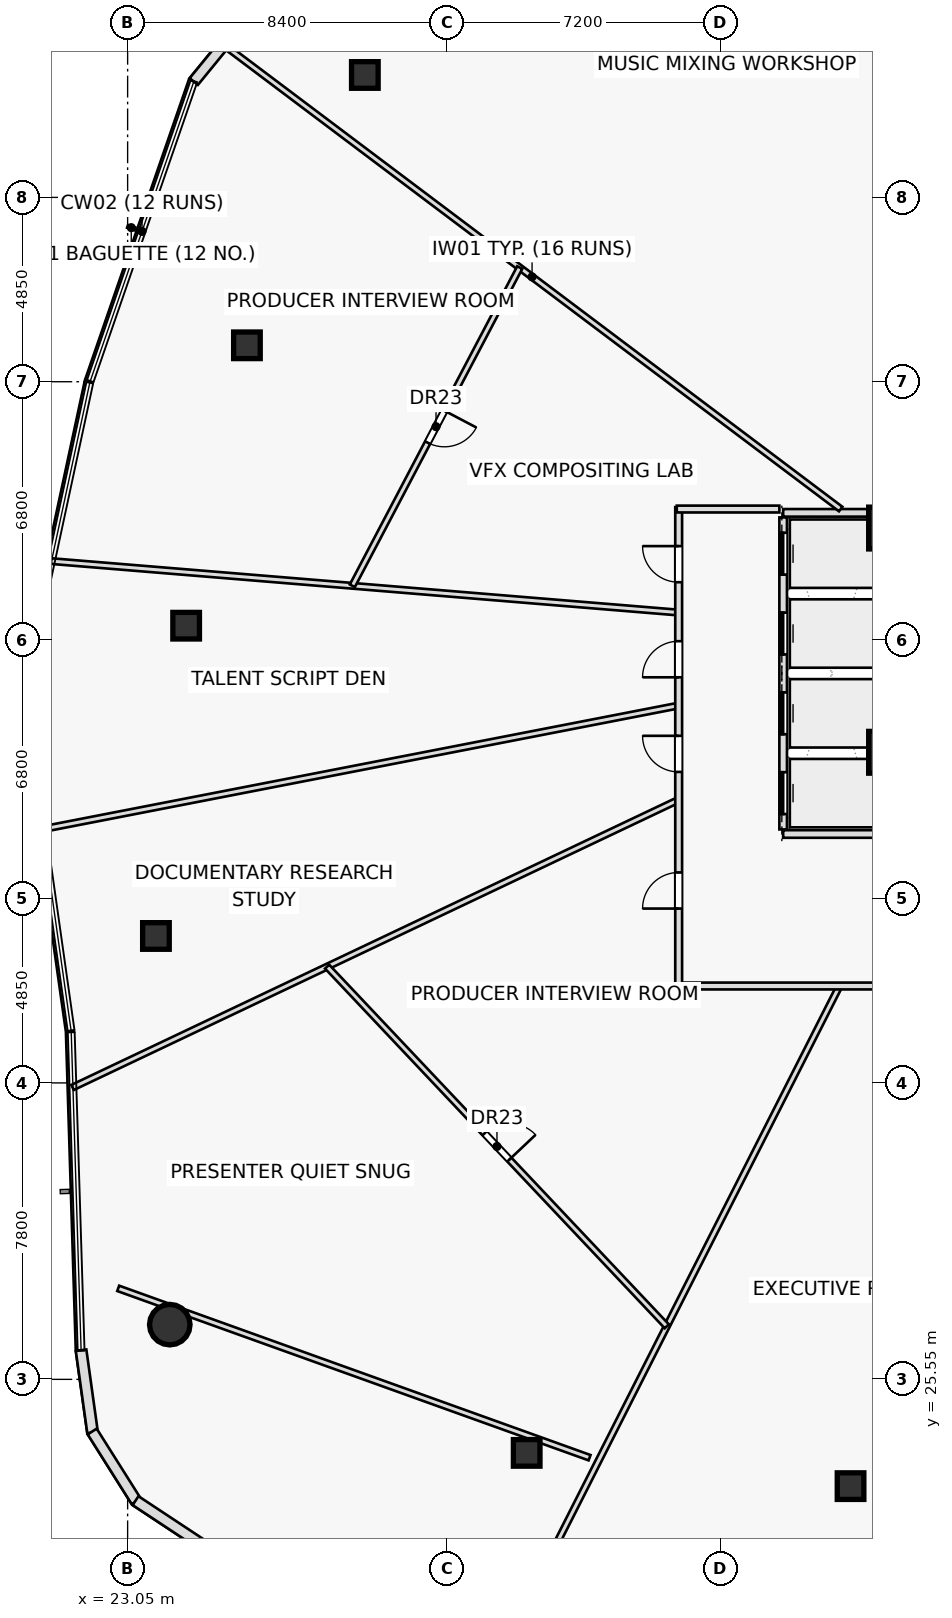
"""IFC4 building model, lengths in metres.
Left out: names, types, materials, properties, quantities, classifications, styles, units other than length and angle.
Written with IfcOpenShell. Run it as: python <this file> out.ifc"""

import sys

from ifc_helpers import new_model, si_unit, direction, frame, frame_2d, origin, origin_2d, place, context, subcontext, project, spatial, rectangle, hollow_rectangle, hollow_circle, extrude, element, fill, save


model = new_model("IFC4")
c1 = context("Model", 3, precision=1e-05, world=origin(), true_north=direction((0.0, 1.0)))
c2 = subcontext(c1, "Body", "Model", "MODEL_VIEW")
j1 = project(units=[si_unit("LENGTHUNIT", "METRE"), si_unit("PLANEANGLEUNIT", "RADIAN")], contexts=[c1])
p1 = place(None, origin())
s1 = spatial("IfcSite", under=j1, at=p1, CompositionType="ELEMENT")
p2 = place(p1, origin())
s2 = spatial("IfcBuilding", under=s1, at=p2, CompositionType="ELEMENT")
p3 = place(p2, frame((0.0, 0.0, 86.1)))
s3 = spatial("IfcBuildingStorey", under=s2, at=p3, CompositionType="ELEMENT", Elevation=86.1)
for number, where, z_axis, x_axis in (
    (1, (43.1, 47.95, 0.0), (0.0, 0.0, 1.0), (1.0, 0.0, 0.0)),
    (2, (43.1, 42.05, 0.0), (0.0, 0.0, 1.0), (1.0, 0.0, 0.0)),
):
    element("IfcColumn", number, at=place(p3, frame(where, z_axis=z_axis, x_axis=x_axis)), inside=s3, PredefinedType="COLUMN", context=c2, shape_type="SweptSolid", body=[
        extrude(rectangle(XDim=1.1, YDim=1.1, at=origin_2d()), origin(), (0.0, 0.0, 1.0), 3.6),
    ])
for number, where, z_axis, x_axis in (
    (3, (29.292, 59.872, 0.0), (0.0, 0.0, 1.0), (1.0, 0.0, 0.0)),
    (4, (26.189, 52.758, 0.0), (0.0, 0.0, 1.0), (1.0, 0.0, 0.0)),
    (5, (24.59, 45.381, 0.0), (0.0, 0.0, 1.0), (1.0, 0.0, 0.0)),
    (6, (23.795, 37.216, 0.0), (0.0, 0.0, 1.0), (1.0, 0.0, 0.0)),
):
    element("IfcColumn", number, at=place(p3, frame(where, z_axis=z_axis, x_axis=x_axis)), inside=s3, PredefinedType="COLUMN", context=c2, shape_type="SweptSolid", body=[
        extrude(hollow_rectangle(XDim=0.7, YDim=0.7, WallThickness=0.04, at=origin_2d()), origin(), (0.0, 0.0, 1.0), 3.6),
    ])
p4 = place(p3, frame((24.159, 26.99, 0.0), z_axis=(0.0, 0.0, 1.0), x_axis=(1.0, 0.0, 0.0)))
e7 = element("IfcColumn", 7, at=p4, inside=s3, PredefinedType="COLUMN", context=c2, shape_type="SweptSolid", body=[
    extrude(hollow_circle(Radius=0.533, WallThickness=0.045, at=origin_2d()), origin(), (0.0, 0.0, 1.0), 3.6),
])
for number, where, z_axis, x_axis in (
    (8, (33.551, 23.615, 0.0), (0.0, 0.0, 1.0), (1.0, 0.0, 0.0)),
    (9, (42.073, 22.74, 0.0), (0.0, 0.0, 1.0), (1.0, 0.0, 0.0)),
):
    element("IfcColumn", number, at=place(p3, frame(where, z_axis=z_axis, x_axis=x_axis)), inside=s3, PredefinedType="COLUMN", context=c2, shape_type="SweptSolid", body=[
        extrude(hollow_rectangle(XDim=0.7, YDim=0.7, WallThickness=0.04, at=origin_2d()), origin(), (0.0, 0.0, 1.0), 3.6),
    ])
for number, where, z_axis, x_axis in (
    (10, (40.3, 39.9, 0.0), (0.0, 0.0, 1.0), (1.0, 0.0, 0.0)),
    (11, (40.3, 48.35, 0.0), (0.0, 0.0, 1.0), (1.0, 0.0, 0.0)),
):
    element("IfcWall", number, at=place(p3, frame(where, z_axis=z_axis, x_axis=x_axis)), inside=s3, PredefinedType="PARTITIONING", context=c2, shape_type="SweptSolid", body=[
        extrude(rectangle(XDim=2.5, YDim=0.2, at=frame_2d((1.25, 0.0))), origin(), (0.0, 0.0, 1.0), 3.6),
    ])
p5 = place(p3, frame((22.802, 27.945, 0.0), z_axis=(0.0, 0.0, 1.0), x_axis=(0.941102349209, -0.338121824662, 0.0)))
e12 = element("IfcWall", 12, at=p5, inside=s3, PredefinedType="PARTITIONING", context=c2, shape_type="SweptSolid", body=[
    extrude(rectangle(XDim=13.18, YDim=0.15, at=frame_2d((6.59, 0.0))), origin(), (0.0, 0.0, 1.0), 2.975),
])
p6 = place(p3, frame((37.55, 43.28, 0.0), z_axis=(0.0, 0.0, 1.0), x_axis=(-0.9816263354, -0.190813358152, 0.0)))
e13 = element("IfcWall", 13, at=p6, inside=s3, PredefinedType="PARTITIONING", context=c2, shape_type="SweptSolid", body=[
    extrude(rectangle(XDim=17.062, YDim=0.15, at=frame_2d((8.531, 0.0))), origin(), (0.0, 0.0, 1.0), 3.025),
])
p7 = place(p3, frame((37.55, 40.8, 0.0), z_axis=(0.0, 0.0, 1.0), x_axis=(-0.903418546956, -0.428759756759, 0.0)))
e14 = element("IfcWall", 14, at=p7, inside=s3, PredefinedType="PARTITIONING", context=c2, shape_type="SweptSolid", body=[
    extrude(rectangle(XDim=17.654, YDim=0.15, at=frame_2d((8.827, 0.0))), origin(), (0.0, 0.0, 1.0), 2.975),
])
p8 = place(p3, frame((41.782, 35.9, 0.0), z_axis=(0.0, 0.0, 1.0), x_axis=(-0.452547459276, -0.891740319321, 0.0)))
e15 = element("IfcWall", 15, at=p8, inside=s3, PredefinedType="PARTITIONING", context=c2, shape_type="SweptSolid", body=[
    extrude(rectangle(XDim=17.312, YDim=0.15, at=frame_2d((8.656, 0.0))), origin(), (0.0, 0.0, 1.0), 2.975),
])
p9 = place(p3, frame((41.814, 48.45, 0.0), z_axis=(0.0, 0.0, 1.0), x_axis=(-0.79913144575, 0.601156329429, 0.0)))
e16 = element("IfcWall", 16, at=p9, inside=s3, PredefinedType="PARTITIONING", context=c2, shape_type="SweptSolid", body=[
    extrude(rectangle(XDim=20.325, YDim=0.15, at=frame_2d((10.163, 0.0))), origin(), (0.0, 0.0, 1.0), 2.975),
])
p10 = place(p3, frame((37.55, 45.726, 0.0), z_axis=(0.0, 0.0, 1.0), x_axis=(-0.996651933506, 0.081761381101, 0.0)))
e17 = element("IfcWall", 17, at=p10, inside=s3, PredefinedType="PARTITIONING", context=c2, shape_type="SweptSolid", body=[
    extrude(rectangle(XDim=16.569, YDim=0.15, at=frame_2d((8.285, 0.0))), origin(), (0.0, 0.0, 1.0), 2.975),
])
p11 = place(p3, frame((33.368, 54.804, 0.0), z_axis=(0.0, 0.0, 1.0), x_axis=(-0.465574129331, -0.885008887016, 0.0)))
e18 = element("IfcWall", 18, at=p11, inside=s3, PredefinedType="PARTITIONING", context=c2, shape_type="SweptSolid", body=[
    extrude(rectangle(XDim=9.461, YDim=0.15, at=frame_2d((4.73, 0.0))), origin(), (0.0, 0.0, 1.0), 2.975),
])
p12 = place(p11, frame((4.256, 0.0, 0.0)))
e19 = element("IfcOpeningElement", 19, at=p12, cuts=e18, PredefinedType="OPENING", context=c2, shape_type="SweptSolid", body=[
    extrude(rectangle(XDim=0.95, YDim=2.05, at=frame_2d((0.475, 1.025))), frame((0.0, 0.085, 0.0), z_axis=(0.0, -1.0, 0.0), x_axis=(1.0, 0.0, 0.0)), (0.0, 0.0, 1.0), 0.17),
])
p13 = place(p3, frame((28.3, 36.409, 0.0), z_axis=(0.0, 0.0, 1.0), x_axis=(0.686638402181, -0.726999109113, 0.0)))
e20 = element("IfcWall", 20, at=p13, inside=s3, PredefinedType="PARTITIONING", context=c2, shape_type="SweptSolid", body=[
    extrude(rectangle(XDim=13.017, YDim=0.15, at=frame_2d((6.509, 0.0))), origin(), (0.0, 0.0, 1.0), 2.975),
])
p14 = place(p13, frame((6.034, 0.0, 0.0)))
e21 = element("IfcOpeningElement", 21, at=p14, cuts=e20, PredefinedType="OPENING", context=c2, shape_type="SweptSolid", body=[
    extrude(rectangle(XDim=0.95, YDim=2.05, at=frame_2d((0.475, 1.025))), frame((0.0, 0.085, 0.0), z_axis=(0.0, -1.0, 0.0), x_axis=(1.0, 0.0, 0.0)), (0.0, 0.0, 1.0), 0.17),
])
p15 = place(p3, frame((59.55, 35.9, 0.0), z_axis=(0.0, 0.0, 1.0), x_axis=(-1.0, 0.0, 0.0)))
e22 = element("IfcWall", 22, at=p15, inside=s3, PredefinedType="PARTITIONING", context=c2, shape_type="SweptSolid", body=[
    extrude(rectangle(XDim=22.05, YDim=0.18, at=frame_2d((11.025, 0.0))), origin(), (0.0, 0.0, 1.0), 2.975),
])
p16 = place(p15, frame((3.972, 0.0, 0.0)))
e23 = element("IfcOpeningElement", 23, at=p16, cuts=e22, PredefinedType="OPENING", context=c2, shape_type="SweptSolid", body=[
    extrude(rectangle(XDim=0.95, YDim=2.05, at=frame_2d((0.475, 1.025))), frame((0.0, 0.1, 0.0), z_axis=(0.0, -1.0, 0.0), x_axis=(1.0, 0.0, 0.0)), (0.0, 0.0, 1.0), 0.2),
])
p17 = place(p15, frame((10.039, 0.0, 0.0)))
e24 = element("IfcOpeningElement", 24, at=p17, cuts=e22, PredefinedType="OPENING", context=c2, shape_type="SweptSolid", body=[
    extrude(rectangle(XDim=0.95, YDim=2.05, at=frame_2d((0.475, 1.025))), frame((0.0, 0.1, 0.0), z_axis=(0.0, -1.0, 0.0), x_axis=(1.0, 0.0, 0.0)), (0.0, 0.0, 1.0), 0.2),
])
p18 = place(p15, frame((14.606, 0.0, 0.0)))
e25 = element("IfcOpeningElement", 25, at=p18, cuts=e22, PredefinedType="OPENING", context=c2, shape_type="SweptSolid", body=[
    extrude(rectangle(XDim=0.95, YDim=2.05, at=frame_2d((0.475, 1.025))), frame((0.0, 0.1, 0.0), z_axis=(0.0, -1.0, 0.0), x_axis=(1.0, 0.0, 0.0)), (0.0, 0.0, 1.0), 0.2),
])
p19 = place(p3, frame((37.55, 35.85, 0.0), z_axis=(0.0, 0.0, 1.0), x_axis=(0.0, 1.0, 0.0)))
e26 = element("IfcWall", 26, at=p19, inside=s3, PredefinedType="PARTITIONING", context=c2, shape_type="SweptSolid", body=[
    extrude(rectangle(XDim=12.65, YDim=0.18, at=frame_2d((6.325, 0.0))), origin(), (0.0, 0.0, 1.0), 2.975),
])
p20 = place(p19, frame((2.088, 0.0, 0.0)))
e27 = element("IfcOpeningElement", 27, at=p20, cuts=e26, PredefinedType="OPENING", context=c2, shape_type="SweptSolid", body=[
    extrude(rectangle(XDim=0.95, YDim=2.05, at=frame_2d((0.475, 1.025))), frame((0.0, 0.1, 0.0), z_axis=(0.0, -1.0, 0.0), x_axis=(1.0, 0.0, 0.0)), (0.0, 0.0, 1.0), 0.2),
])
p21 = place(p19, frame((5.683, 0.0, 0.0)))
e28 = element("IfcOpeningElement", 28, at=p21, cuts=e26, PredefinedType="OPENING", context=c2, shape_type="SweptSolid", body=[
    extrude(rectangle(XDim=0.95, YDim=2.05, at=frame_2d((0.475, 1.025))), frame((0.0, 0.1, 0.0), z_axis=(0.0, -1.0, 0.0), x_axis=(1.0, 0.0, 0.0)), (0.0, 0.0, 1.0), 0.2),
])
p22 = place(p19, frame((8.173, 0.0, 0.0)))
e29 = element("IfcOpeningElement", 29, at=p22, cuts=e26, PredefinedType="OPENING", context=c2, shape_type="SweptSolid", body=[
    extrude(rectangle(XDim=0.95, YDim=2.05, at=frame_2d((0.475, 1.025))), frame((0.0, 0.1, 0.0), z_axis=(0.0, -1.0, 0.0), x_axis=(1.0, 0.0, 0.0)), (0.0, 0.0, 1.0), 0.2),
])
p23 = place(p19, frame((10.675, 0.0, 0.0)))
e30 = element("IfcOpeningElement", 30, at=p23, cuts=e26, PredefinedType="OPENING", context=c2, shape_type="SweptSolid", body=[
    extrude(rectangle(XDim=0.95, YDim=2.05, at=frame_2d((0.475, 1.025))), frame((0.0, 0.1, 0.0), z_axis=(0.0, -1.0, 0.0), x_axis=(1.0, 0.0, 0.0)), (0.0, 0.0, 1.0), 0.2),
])
p24 = place(p3, frame((37.5, 48.45, 0.0), z_axis=(0.0, 0.0, 1.0), x_axis=(1.0, 0.0, 0.0)))
e31 = element("IfcWall", 31, at=p24, inside=s3, PredefinedType="PARTITIONING", context=c2, shape_type="SweptSolid", body=[
    extrude(rectangle(XDim=2.7, YDim=0.18, at=frame_2d((1.35, 0.0))), origin(), (0.0, 0.0, 1.0), 3.6),
])
p25 = place(p3, frame((30.499, 66.681, 0.0), z_axis=(0.0, 0.0, 1.0), x_axis=(-0.632922306021, -0.774215315362, 0.0)))
e32 = element("IfcWall", 32, at=p25, inside=s3, PredefinedType="STANDARD", context=c2, shape_type="SweptSolid", body=[
    extrude(rectangle(XDim=9.02, YDim=0.28, at=frame_2d((4.51, 0.0))), origin(), (0.0, 0.0, 1.0), 3.6),
])
p26 = place(p3, frame((21.825, 26.317, 0.0), z_axis=(0.0, 0.0, 1.0), x_axis=(0.138280046883, -0.990393168713, 0.0)))
e33 = element("IfcWall", 33, at=p26, inside=s3, PredefinedType="STANDARD", context=c2, shape_type="SweptSolid", body=[
    extrude(rectangle(XDim=2.188, YDim=0.28, at=frame_2d((1.094, 0.0))), origin(), (0.0, 0.0, 1.0), 3.6),
])
p27 = place(p3, frame((22.118, 24.178, 0.0), z_axis=(0.0, 0.0, 1.0), x_axis=(0.533604581083, -0.845734090035, 0.0)))
e34 = element("IfcWall", 34, at=p27, inside=s3, PredefinedType="STANDARD", context=c2, shape_type="SweptSolid", body=[
    extrude(rectangle(XDim=2.176, YDim=0.28, at=frame_2d((1.088, 0.0))), origin(), (0.0, 0.0, 1.0), 3.6),
])
p28 = place(p3, frame((23.258, 22.358, 0.0), z_axis=(0.0, 0.0, 1.0), x_axis=(0.834339006768, -0.551251686424, 0.0)))
e35 = element("IfcWall", 35, at=p28, inside=s3, PredefinedType="STANDARD", context=c2, shape_type="SweptSolid", body=[
    extrude(rectangle(XDim=2.176, YDim=0.28, at=frame_2d((1.088, 0.0))), origin(), (0.0, 0.0, 1.0), 3.6),
])
p29 = place(p3, frame((40.3, 40.02, 0.0), z_axis=(0.0, 0.0, 1.0), x_axis=(0.0, 1.0, 0.0)))
e36 = element("IfcWall", 36, at=p29, inside=s3, PredefinedType="PARTITIONING", context=c2, shape_type="SweptSolid", body=[
    extrude(rectangle(XDim=8.21, YDim=0.2, at=frame_2d((4.105, 0.0))), origin(), (0.0, 0.0, 1.0), 3.6),
])
p30 = place(p29, frame((0.405, 0.0, 0.0)))
e37 = element("IfcOpeningElement", 37, at=p30, cuts=e36, PredefinedType="OPENING", context=c2, shape_type="SweptSolid", body=[
    extrude(rectangle(XDim=1.1, YDim=2.15, at=frame_2d((0.55, 1.075))), frame((0.0, 0.11, 0.0), z_axis=(0.0, -1.0, 0.0), x_axis=(1.0, 0.0, 0.0)), (0.0, 0.0, 1.0), 0.22),
])
p31 = place(p29, frame((2.505, 0.0, 0.0)))
e38 = element("IfcOpeningElement", 38, at=p31, cuts=e36, PredefinedType="OPENING", context=c2, shape_type="SweptSolid", body=[
    extrude(rectangle(XDim=1.1, YDim=2.15, at=frame_2d((0.55, 1.075))), frame((0.0, 0.11, 0.0), z_axis=(0.0, -1.0, 0.0), x_axis=(1.0, 0.0, 0.0)), (0.0, 0.0, 1.0), 0.22),
])
p32 = place(p29, frame((4.605, 0.0, 0.0)))
e39 = element("IfcOpeningElement", 39, at=p32, cuts=e36, PredefinedType="OPENING", context=c2, shape_type="SweptSolid", body=[
    extrude(rectangle(XDim=1.1, YDim=2.15, at=frame_2d((0.55, 1.075))), frame((0.0, 0.11, 0.0), z_axis=(0.0, -1.0, 0.0), x_axis=(1.0, 0.0, 0.0)), (0.0, 0.0, 1.0), 0.22),
])
p33 = place(p29, frame((6.705, 0.0, 0.0)))
e40 = element("IfcOpeningElement", 40, at=p33, cuts=e36, PredefinedType="OPENING", context=c2, shape_type="SweptSolid", body=[
    extrude(rectangle(XDim=1.1, YDim=2.15, at=frame_2d((0.55, 1.075))), frame((0.0, 0.11, 0.0), z_axis=(0.0, -1.0, 0.0), x_axis=(1.0, 0.0, 0.0)), (0.0, 0.0, 1.0), 0.22),
])
p34 = place(p12, origin())
e41 = element("IfcDoor", 41, at=p34, inside=s3, OperationType="SINGLE_SWING_LEFT", PredefinedType="DOOR", context=c2, shape_type="SweptSolid", body=[
    extrude(rectangle(XDim=0.95, YDim=2.05, at=frame_2d((0.475, 1.025))), frame((0.0, 0.025, 0.0), z_axis=(0.0, -1.0, 0.0), x_axis=(1.0, 0.0, 0.0)), (0.0, 0.0, 1.0), 0.05),
])
fill(e19, e41)
p35 = place(p14, origin())
e42 = element("IfcDoor", 42, at=p35, inside=s3, OperationType="SINGLE_SWING_RIGHT", PredefinedType="DOOR", context=c2, shape_type="SweptSolid", body=[
    extrude(rectangle(XDim=0.95, YDim=2.05, at=frame_2d((0.475, 1.025))), frame((0.0, 0.025, 0.0), z_axis=(0.0, -1.0, 0.0), x_axis=(1.0, 0.0, 0.0)), (0.0, 0.0, 1.0), 0.05),
])
fill(e21, e42)
p36 = place(p20, origin())
e43 = element("IfcDoor", 43, at=p36, inside=s3, OperationType="SINGLE_SWING_LEFT", PredefinedType="DOOR", context=c2, shape_type="SweptSolid", body=[
    extrude(rectangle(XDim=0.95, YDim=2.05, at=frame_2d((0.475, 1.025))), frame((0.0, 0.025, 0.0), z_axis=(0.0, -1.0, 0.0), x_axis=(1.0, 0.0, 0.0)), (0.0, 0.0, 1.0), 0.05),
])
fill(e27, e43)
p37 = place(p21, origin())
e44 = element("IfcDoor", 44, at=p37, inside=s3, OperationType="SINGLE_SWING_RIGHT", PredefinedType="DOOR", context=c2, shape_type="SweptSolid", body=[
    extrude(rectangle(XDim=0.95, YDim=2.05, at=frame_2d((0.475, 1.025))), frame((0.0, 0.025, 0.0), z_axis=(0.0, -1.0, 0.0), x_axis=(1.0, 0.0, 0.0)), (0.0, 0.0, 1.0), 0.05),
])
fill(e28, e44)
p38 = place(p22, origin())
e45 = element("IfcDoor", 45, at=p38, inside=s3, OperationType="SINGLE_SWING_LEFT", PredefinedType="DOOR", context=c2, shape_type="SweptSolid", body=[
    extrude(rectangle(XDim=0.95, YDim=2.05, at=frame_2d((0.475, 1.025))), frame((0.0, 0.025, 0.0), z_axis=(0.0, -1.0, 0.0), x_axis=(1.0, 0.0, 0.0)), (0.0, 0.0, 1.0), 0.05),
])
fill(e29, e45)
p39 = place(p23, origin())
e46 = element("IfcDoor", 46, at=p39, inside=s3, OperationType="SINGLE_SWING_RIGHT", PredefinedType="DOOR", context=c2, shape_type="SweptSolid", body=[
    extrude(rectangle(XDim=0.95, YDim=2.05, at=frame_2d((0.475, 1.025))), frame((0.0, 0.025, 0.0), z_axis=(0.0, -1.0, 0.0), x_axis=(1.0, 0.0, 0.0)), (0.0, 0.0, 1.0), 0.05),
])
fill(e30, e46)
p40 = place(p30, origin())
e47 = element("IfcDoor", 47, at=p40, inside=s3, OperationType="SLIDING_TO_LEFT", PredefinedType="DOOR", context=c2, shape_type="SweptSolid", body=[
    extrude(rectangle(XDim=1.1, YDim=2.15, at=frame_2d((0.55, 1.075))), frame((0.0, 0.025, 0.0), z_axis=(0.0, -1.0, 0.0), x_axis=(1.0, 0.0, 0.0)), (0.0, 0.0, 1.0), 0.05),
])
fill(e37, e47)
p41 = place(p31, origin())
e48 = element("IfcDoor", 48, at=p41, inside=s3, OperationType="SLIDING_TO_RIGHT", PredefinedType="DOOR", context=c2, shape_type="SweptSolid", body=[
    extrude(rectangle(XDim=1.1, YDim=2.15, at=frame_2d((0.55, 1.075))), frame((0.0, 0.025, 0.0), z_axis=(0.0, -1.0, 0.0), x_axis=(1.0, 0.0, 0.0)), (0.0, 0.0, 1.0), 0.05),
])
fill(e38, e48)
p42 = place(p32, origin())
e49 = element("IfcDoor", 49, at=p42, inside=s3, OperationType="SLIDING_TO_LEFT", PredefinedType="DOOR", context=c2, shape_type="SweptSolid", body=[
    extrude(rectangle(XDim=1.1, YDim=2.15, at=frame_2d((0.55, 1.075))), frame((0.0, 0.025, 0.0), z_axis=(0.0, -1.0, 0.0), x_axis=(1.0, 0.0, 0.0)), (0.0, 0.0, 1.0), 0.05),
])
fill(e39, e49)
p43 = place(p33, origin())
e50 = element("IfcDoor", 50, at=p43, inside=s3, OperationType="SLIDING_TO_RIGHT", PredefinedType="DOOR", context=c2, shape_type="SweptSolid", body=[
    extrude(rectangle(XDim=1.1, YDim=2.15, at=frame_2d((0.55, 1.075))), frame((0.0, 0.025, 0.0), z_axis=(0.0, -1.0, 0.0), x_axis=(1.0, 0.0, 0.0)), (0.0, 0.0, 1.0), 0.05),
])
fill(e40, e50)
save(model, sys.argv[1])
